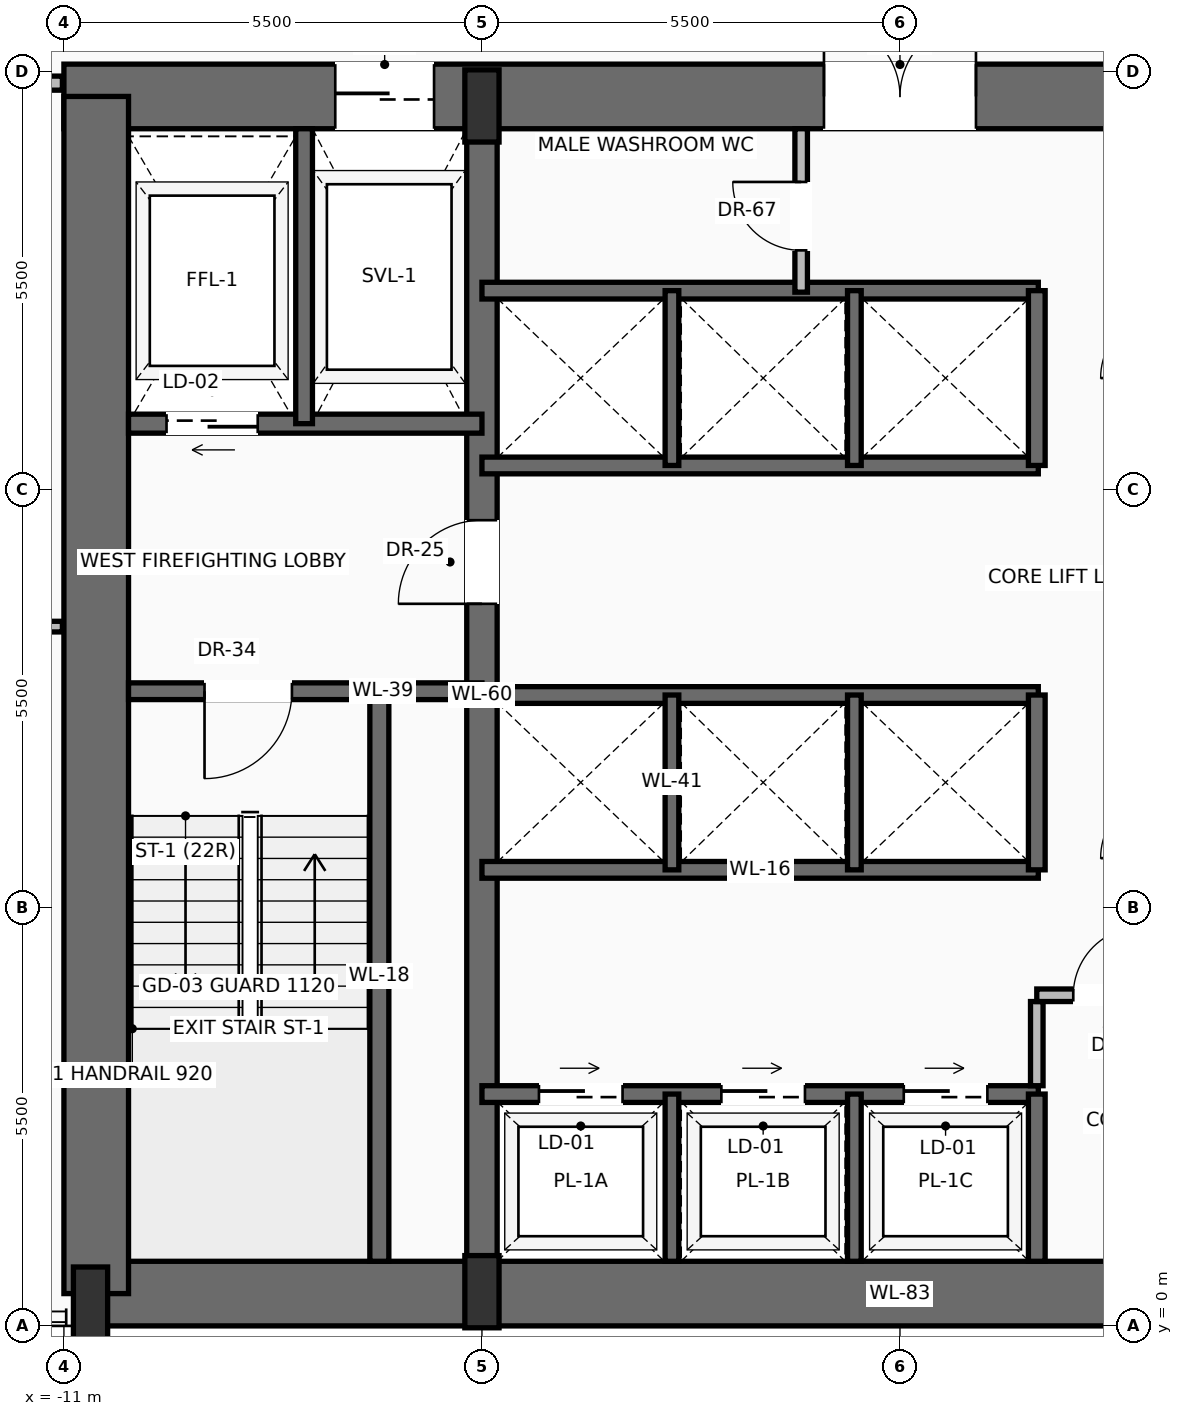
"""IFC4 building model, lengths in metres.
Left out: names, types, materials, properties, quantities, classifications, styles, units other than length and angle.
Written with IfcOpenShell. Run it as: python <this file> out.ifc"""

import sys

from ifc_helpers import new_model, si_unit, direction, frame, frame_2d, origin, origin_2d, place, context, subcontext, project, spatial, rectangle, extrude, source, transform, mapped, element, fill, save


model = new_model("IFC4")
c1 = context("Model", 3, precision=1e-05, world=origin(), true_north=direction((0.0, 1.0)))
c2 = subcontext(c1, "Body", "Model", "MODEL_VIEW")
j1 = project(units=[si_unit("LENGTHUNIT", "METRE"), si_unit("PLANEANGLEUNIT", "RADIAN")], contexts=[c1])
p1 = place(None, origin())
s1 = spatial("IfcSite", under=j1, at=p1, CompositionType="ELEMENT")
p2 = place(p1, origin())
s2 = spatial("IfcBuilding", under=s1, at=p2, CompositionType="ELEMENT")
p3 = place(p2, frame((0.0, 0.0, 64.5)))
s3 = spatial("IfcBuildingStorey", under=s2, at=p3, CompositionType="ELEMENT", Elevation=64.5)
p4 = place(p3, frame((-10.65, 0.425, 0.0), z_axis=(0.0, 0.0, 1.0), x_axis=(1.0, 0.0, 0.0)))
e1 = element("IfcWall", 1, at=p4, inside=s3, PredefinedType="SHEAR", context=c2, shape_type="SweptSolid", body=[
    extrude(rectangle(XDim=21.3, YDim=0.85, at=frame_2d((10.65, 0.0))), origin(), (0.0, 0.0, 1.0), 3.45),
])
p5 = place(p3, frame((-11.0, 16.175, 0.0), z_axis=(0.0, 0.0, 1.0), x_axis=(1.0, 0.0, 0.0)))
e2 = element("IfcWall", 2, at=p5, inside=s3, PredefinedType="SHEAR", context=c2, shape_type="SweptSolid", body=[
    extrude(rectangle(XDim=22.0, YDim=0.85, at=frame_2d((11.0, 0.0))), origin(), (0.0, 0.0, 1.0), 3.45),
])
p6 = place(p5, frame((3.57, 0.0, 0.0)))
e3 = element("IfcOpeningElement", 3, at=p6, cuts=e2, PredefinedType="OPENING", context=c2, shape_type="SweptSolid", body=[
    extrude(rectangle(XDim=1.3, YDim=2.3, at=frame_2d((0.65, 1.15))), frame((0.0, 0.435, 0.0), z_axis=(0.0, -1.0, 0.0), x_axis=(1.0, 0.0, 0.0)), (0.0, 0.0, 1.0), 0.87),
])
p7 = place(p5, frame((10.0, 0.0, 0.0)))
e4 = element("IfcOpeningElement", 4, at=p7, cuts=e2, PredefinedType="OPENING", context=c2, shape_type="SweptSolid", body=[
    extrude(rectangle(XDim=2.0, YDim=2.4, at=frame_2d((1.0, 1.2))), frame((0.0, 0.435, 0.0), z_axis=(0.0, -1.0, 0.0), x_axis=(1.0, 0.0, 0.0)), (0.0, 0.0, 1.0), 0.87),
])
p8 = place(p3, frame((-10.575, 0.425, 0.0), z_axis=(0.0, 0.0, 1.0), x_axis=(0.0, 1.0, 0.0)))
e5 = element("IfcWall", 5, at=p8, inside=s3, PredefinedType="SHEAR", context=c2, shape_type="SweptSolid", body=[
    extrude(rectangle(XDim=15.75, YDim=0.85, at=frame_2d((7.875, 0.0))), origin(), (0.0, 0.0, 1.0), 3.45),
])
p9 = place(p3, frame((-5.5, 0.425, 0.0), z_axis=(0.0, 0.0, 1.0), x_axis=(0.0, 1.0, 0.0)))
e6 = element("IfcWall", 6, at=p9, inside=s3, PredefinedType="SHEAR", context=c2, shape_type="SweptSolid", body=[
    extrude(rectangle(XDim=15.75, YDim=0.4, at=frame_2d((7.875, 0.0))), origin(), (0.0, 0.0, 1.0), 3.45),
])
p10 = place(p9, frame((9.075, 0.0, 0.0)))
e7 = element("IfcOpeningElement", 7, at=p10, cuts=e6, PredefinedType="OPENING", context=c2, shape_type="SweptSolid", body=[
    extrude(rectangle(XDim=1.1, YDim=2.2, at=frame_2d((0.55, 1.1))), frame((0.0, 0.21, 0.0), z_axis=(0.0, -1.0, 0.0), x_axis=(1.0, 0.0, 0.0)), (0.0, 0.0, 1.0), 0.42),
])
m1 = source(origin(), c2, "Body", "SweptSolid", [
    extrude(rectangle(XDim=0.45, YDim=0.95, at=origin_2d()), origin(), (0.0, 0.0, 1.0), 3.7),
])
for number, where, z_axis, x_axis in (
    (8, (-10.65, 0.3, 0.0), (0.0, 0.0, 1.0), (1.0, 0.0, 0.0)),
    (9, (-5.5, 0.45, 0.0), (0.0, 0.0, 1.0), (1.0, 0.0, 0.0)),
    (10, (-5.5, 16.05, 0.0), (0.0, 0.0, 1.0), (1.0, 0.0, 0.0)),
):
    element("IfcColumn", number, at=place(p3, frame(where, z_axis=z_axis, x_axis=x_axis)), inside=s3, PredefinedType="PILASTER", context=c2, shape_type="MappedRepresentation", body=[
        mapped(m1, transform((0.0, 0.0, 0.0), scale=1.0)),
    ])
p11 = place(p3, frame((-6.85, 0.85, 0.0), z_axis=(0.0, 0.0, 1.0), x_axis=(0.0, 1.0, 0.0)))
e11 = element("IfcWall", 11, at=p11, inside=s3, PredefinedType="SOLIDWALL", context=c2, shape_type="SweptSolid", body=[
    extrude(rectangle(XDim=7.5, YDim=0.25, at=frame_2d((3.75, 0.0))), origin(), (0.0, 0.0, 1.0), 3.45),
])
p12 = place(p3, frame((-5.5, 8.35, 0.0), z_axis=(0.0, 0.0, 1.0), x_axis=(-1.0, 0.0, 0.0)))
e12 = element("IfcWall", 12, at=p12, inside=s3, PredefinedType="SOLIDWALL", context=c2, shape_type="SweptSolid", body=[
    extrude(rectangle(XDim=4.65, YDim=0.22, at=frame_2d((2.325, 0.0))), origin(), (0.0, 0.0, 1.0), 3.45),
])
p13 = place(p12, frame((2.5, 0.0, 0.0)))
e13 = element("IfcOpeningElement", 13, at=p13, cuts=e12, PredefinedType="OPENING", context=c2, shape_type="SweptSolid", body=[
    extrude(rectangle(XDim=1.15, YDim=2.2, at=frame_2d((0.575, 1.1))), frame((0.0, 0.12, 0.0), z_axis=(0.0, -1.0, 0.0), x_axis=(1.0, 0.0, 0.0)), (0.0, 0.0, 1.0), 0.24),
])
p14 = place(p3, frame((-5.5, 11.87, 0.0), z_axis=(0.0, 0.0, 1.0), x_axis=(-1.0, 0.0, 0.0)))
e14 = element("IfcWall", 14, at=p14, inside=s3, PredefinedType="SOLIDWALL", context=c2, shape_type="SweptSolid", body=[
    extrude(rectangle(XDim=4.65, YDim=0.25, at=frame_2d((2.325, 0.0))), origin(), (0.0, 0.0, 1.0), 3.45),
])
p15 = place(p14, frame((2.95, 0.0, 0.0)))
e15 = element("IfcOpeningElement", 15, at=p15, cuts=e14, PredefinedType="OPENING", context=c2, shape_type="SweptSolid", body=[
    extrude(rectangle(XDim=1.2, YDim=2.25, at=frame_2d((0.6, 1.125))), frame((0.0, 0.135, 0.0), z_axis=(0.0, -1.0, 0.0), x_axis=(1.0, 0.0, 0.0)), (0.0, 0.0, 1.0), 0.27),
])
p16 = place(p3, frame((-7.84, 11.87, 0.0), z_axis=(0.0, 0.0, 1.0), x_axis=(0.0, 1.0, 0.0)))
e16 = element("IfcWall", 16, at=p16, inside=s3, PredefinedType="SOLIDWALL", context=c2, shape_type="SweptSolid", body=[
    extrude(rectangle(XDim=3.88, YDim=0.22, at=frame_2d((1.94, 0.0))), origin(), (0.0, 0.0, 1.0), 3.45),
])
p17 = place(p3, frame((-5.5, 3.05, 0.0), z_axis=(0.0, 0.0, 1.0), x_axis=(1.0, 0.0, 0.0)))
e17 = element("IfcWall", 17, at=p17, inside=s3, PredefinedType="SOLIDWALL", context=c2, shape_type="SweptSolid", body=[
    extrude(rectangle(XDim=7.32, YDim=0.22, at=frame_2d((3.66, 0.0))), origin(), (0.0, 0.0, 1.0), 3.45),
])
p18 = place(p17, frame((0.75, 0.0, 0.0)))
e18 = element("IfcOpeningElement", 18, at=p18, cuts=e17, PredefinedType="OPENING", context=c2, shape_type="SweptSolid", body=[
    extrude(rectangle(XDim=1.1, YDim=2.2, at=frame_2d((0.55, 1.1))), frame((0.0, 0.12, 0.0), z_axis=(0.0, -1.0, 0.0), x_axis=(1.0, 0.0, 0.0)), (0.0, 0.0, 1.0), 0.24),
])
p19 = place(p17, frame((3.15, 0.0, 0.0)))
e19 = element("IfcOpeningElement", 19, at=p19, cuts=e17, PredefinedType="OPENING", context=c2, shape_type="SweptSolid", body=[
    extrude(rectangle(XDim=1.1, YDim=2.2, at=frame_2d((0.55, 1.1))), frame((0.0, 0.12, 0.0), z_axis=(0.0, -1.0, 0.0), x_axis=(1.0, 0.0, 0.0)), (0.0, 0.0, 1.0), 0.24),
])
p20 = place(p17, frame((5.55, 0.0, 0.0)))
e20 = element("IfcOpeningElement", 20, at=p20, cuts=e17, PredefinedType="OPENING", context=c2, shape_type="SweptSolid", body=[
    extrude(rectangle(XDim=1.1, YDim=2.2, at=frame_2d((0.55, 1.1))), frame((0.0, 0.12, 0.0), z_axis=(0.0, -1.0, 0.0), x_axis=(1.0, 0.0, 0.0)), (0.0, 0.0, 1.0), 0.24),
])
p21 = place(p3, frame((1.8, 0.85, 0.0), z_axis=(0.0, 0.0, 1.0), x_axis=(0.0, 1.0, 0.0)))
e21 = element("IfcWall", 21, at=p21, inside=s3, PredefinedType="SOLIDWALL", context=c2, shape_type="SweptSolid", body=[
    extrude(rectangle(XDim=2.2, YDim=0.22, at=frame_2d((1.1, 0.0))), origin(), (0.0, 0.0, 1.0), 3.45),
])
for number, where, z_axis, x_axis in (
    (22, (-3.0, 0.85, 0.0), (0.0, 0.0, 1.0), (0.0, 1.0, 0.0)),
    (23, (-0.6, 0.85, 0.0), (0.0, 0.0, 1.0), (0.0, 1.0, 0.0)),
):
    element("IfcWall", number, at=place(p3, frame(where, z_axis=z_axis, x_axis=x_axis)), inside=s3, PredefinedType="SOLIDWALL", context=c2, shape_type="SweptSolid", body=[
        extrude(rectangle(XDim=2.2, YDim=0.18, at=frame_2d((1.1, 0.0))), origin(), (0.0, 0.0, 1.0), 3.45),
    ])
p22 = place(p3, frame((1.8, 3.16, 0.0), z_axis=(0.0, 0.0, 1.0), x_axis=(0.0, 1.0, 0.0)))
e24 = element("IfcWall", 24, at=p22, inside=s3, PredefinedType="PARTITIONING", context=c2, shape_type="SweptSolid", body=[
    extrude(rectangle(XDim=1.108, YDim=0.165, at=frame_2d((0.554, 0.0))), origin(), (0.0, 0.0, 1.0), 3.442),
])
p23 = place(p3, frame((1.8, 4.35, 0.0), z_axis=(0.0, 0.0, 1.0), x_axis=(1.0, 0.0, 0.0)))
e25 = element("IfcWall", 25, at=p23, inside=s3, PredefinedType="PARTITIONING", context=c2, shape_type="SweptSolid", body=[
    extrude(rectangle(XDim=3.62, YDim=0.165, at=frame_2d((1.81, 0.0))), origin(), (0.0, 0.0, 1.0), 3.442),
])
p24 = place(p23, frame((0.48, 0.0, 0.0)))
e26 = element("IfcOpeningElement", 26, at=p24, cuts=e25, PredefinedType="OPENING", context=c2, shape_type="SweptSolid", body=[
    extrude(rectangle(XDim=0.9, YDim=2.1, at=frame_2d((0.45, 1.05))), frame((0.0, 0.093, 0.0), z_axis=(0.0, -1.0, 0.0), x_axis=(1.0, 0.0, 0.0)), (0.0, 0.0, 1.0), 0.185),
])
for number, where, z_axis, x_axis in (
    (27, (-5.5, 6.0, 0.0), (0.0, 0.0, 1.0), (1.0, 0.0, 0.0)),
    (28, (-5.5, 8.3, 0.0), (0.0, 0.0, 1.0), (1.0, 0.0, 0.0)),
):
    element("IfcWall", number, at=place(p3, frame(where, z_axis=z_axis, x_axis=x_axis)), inside=s3, PredefinedType="SOLIDWALL", context=c2, shape_type="SweptSolid", body=[
        extrude(rectangle(XDim=7.32, YDim=0.22, at=frame_2d((3.66, 0.0))), origin(), (0.0, 0.0, 1.0), 3.45),
    ])
p25 = place(p3, frame((1.8, 6.0, 0.0), z_axis=(0.0, 0.0, 1.0), x_axis=(0.0, 1.0, 0.0)))
e29 = element("IfcWall", 29, at=p25, inside=s3, PredefinedType="SOLIDWALL", context=c2, shape_type="SweptSolid", body=[
    extrude(rectangle(XDim=2.3, YDim=0.22, at=frame_2d((1.15, 0.0))), origin(), (0.0, 0.0, 1.0), 3.45),
])
for number, where, z_axis, x_axis in (
    (30, (-3.0, 6.0, 0.0), (0.0, 0.0, 1.0), (0.0, 1.0, 0.0)),
    (31, (-0.6, 6.0, 0.0), (0.0, 0.0, 1.0), (0.0, 1.0, 0.0)),
):
    element("IfcWall", number, at=place(p3, frame(where, z_axis=z_axis, x_axis=x_axis)), inside=s3, PredefinedType="SOLIDWALL", context=c2, shape_type="SweptSolid", body=[
        extrude(rectangle(XDim=2.3, YDim=0.18, at=frame_2d((1.15, 0.0))), origin(), (0.0, 0.0, 1.0), 3.45),
    ])
for number, where, z_axis, x_axis in (
    (32, (-5.5, 11.32, 0.0), (0.0, 0.0, 1.0), (1.0, 0.0, 0.0)),
    (33, (-5.5, 13.62, 0.0), (0.0, 0.0, 1.0), (1.0, 0.0, 0.0)),
):
    element("IfcWall", number, at=place(p3, frame(where, z_axis=z_axis, x_axis=x_axis)), inside=s3, PredefinedType="SOLIDWALL", context=c2, shape_type="SweptSolid", body=[
        extrude(rectangle(XDim=7.32, YDim=0.22, at=frame_2d((3.66, 0.0))), origin(), (0.0, 0.0, 1.0), 3.45),
    ])
p26 = place(p3, frame((1.8, 11.32, 0.0), z_axis=(0.0, 0.0, 1.0), x_axis=(0.0, 1.0, 0.0)))
e34 = element("IfcWall", 34, at=p26, inside=s3, PredefinedType="SOLIDWALL", context=c2, shape_type="SweptSolid", body=[
    extrude(rectangle(XDim=2.3, YDim=0.22, at=frame_2d((1.15, 0.0))), origin(), (0.0, 0.0, 1.0), 3.45),
])
for number, where, z_axis, x_axis in (
    (35, (-3.0, 11.32, 0.0), (0.0, 0.0, 1.0), (0.0, 1.0, 0.0)),
    (36, (-0.6, 11.32, 0.0), (0.0, 0.0, 1.0), (0.0, 1.0, 0.0)),
):
    element("IfcWall", number, at=place(p3, frame(where, z_axis=z_axis, x_axis=x_axis)), inside=s3, PredefinedType="SOLIDWALL", context=c2, shape_type="SweptSolid", body=[
        extrude(rectangle(XDim=2.3, YDim=0.18, at=frame_2d((1.15, 0.0))), origin(), (0.0, 0.0, 1.0), 3.45),
    ])
p27 = place(p3, frame((-1.3, 13.6, 0.0), z_axis=(0.0, 0.0, 1.0), x_axis=(0.0, 1.0, 0.0)))
e37 = element("IfcWall", 37, at=p27, inside=s3, PredefinedType="PARTITIONING", context=c2, shape_type="SweptSolid", body=[
    extrude(rectangle(XDim=2.15, YDim=0.165, at=frame_2d((1.075, 0.0))), origin(), (0.0, 0.0, 1.0), 3.442),
])
p28 = place(p27, frame((0.55, 0.0, 0.0)))
e38 = element("IfcOpeningElement", 38, at=p28, cuts=e37, PredefinedType="OPENING", context=c2, shape_type="SweptSolid", body=[
    extrude(rectangle(XDim=0.9, YDim=2.1, at=frame_2d((0.45, 1.05))), frame((0.0, 0.093, 0.0), z_axis=(0.0, -1.0, 0.0), x_axis=(1.0, 0.0, 0.0)), (0.0, 0.0, 1.0), 0.185),
])
p29 = place(p3, frame((-24.009, 16.35, 0.0), z_axis=(0.0, 0.0, 1.0), x_axis=(1.0, 0.0, 0.0)))
e39 = element("IfcWall", 39, at=p29, inside=s3, PredefinedType="PARTITIONING", context=c2, shape_type="SweptSolid", body=[
    extrude(rectangle(XDim=12.989, YDim=0.185, at=frame_2d((6.495, 0.0))), origin(), (0.0, 0.0, 1.0), 2.747),
])
p30 = place(p29, frame((5.404, 0.0, 0.0)))
e40 = element("IfcOpeningElement", 40, at=p30, cuts=e39, PredefinedType="OPENING", context=c2, shape_type="SweptSolid", body=[
    extrude(rectangle(XDim=0.95, YDim=2.2, at=frame_2d((0.475, 1.1))), frame((0.0, 0.103, 0.0), z_axis=(0.0, -1.0, 0.0), x_axis=(1.0, 0.0, 0.0)), (0.0, 0.0, 1.0), 0.205),
])
p31 = place(p3, frame((-27.831, 9.2, 0.0), z_axis=(0.0, 0.0, 1.0), x_axis=(1.0, 0.0, 0.0)))
e41 = element("IfcWall", 41, at=p31, inside=s3, PredefinedType="PARTITIONING", context=c2, shape_type="SweptSolid", body=[
    extrude(rectangle(XDim=16.811, YDim=0.14, at=frame_2d((8.405, 0.0))), origin(), (0.0, 0.0, 1.0), 3.442),
])
p32 = place(p31, frame((7.941, 0.0, 0.0)))
e42 = element("IfcOpeningElement", 42, at=p32, cuts=e41, PredefinedType="OPENING", context=c2, shape_type="SweptSolid", body=[
    extrude(rectangle(XDim=0.95, YDim=2.2, at=frame_2d((0.475, 1.1))), frame((0.0, 0.08, 0.0), z_axis=(0.0, -1.0, 0.0), x_axis=(1.0, 0.0, 0.0)), (0.0, 0.0, 1.0), 0.16),
])
m2 = source(origin(), c2, "Body", "SweptSolid", [
    extrude(rectangle(XDim=1.15, YDim=2.2, at=frame_2d((0.575, 1.1))), frame((0.0, 0.025, 0.0), z_axis=(0.0, -1.0, 0.0), x_axis=(1.0, 0.0, 0.0)), (0.0, 0.0, 1.0), 0.05),
])
p33 = place(p13, origin())
e43 = element("IfcDoor", 43, at=p33, inside=s3, OperationType="SINGLE_SWING_RIGHT", PredefinedType="DOOR", context=c2, shape_type="MappedRepresentation", body=[
    mapped(m2, transform((0.0, 0.0, 0.0), scale=1.0)),
])
fill(e13, e43)
m3 = source(origin(), c2, "Body", "SweptSolid", [
    extrude(rectangle(XDim=1.1, YDim=2.2, at=frame_2d((0.55, 1.1))), frame((0.0, 0.025, 0.0), z_axis=(0.0, -1.0, 0.0), x_axis=(1.0, 0.0, 0.0)), (0.0, 0.0, 1.0), 0.05),
])
p34 = place(p10, origin())
e44 = element("IfcDoor", 44, at=p34, inside=s3, OperationType="SINGLE_SWING_LEFT", PredefinedType="DOOR", context=c2, shape_type="MappedRepresentation", body=[
    mapped(m3, transform((0.0, 0.0, 0.0), scale=1.0)),
])
fill(e7, e44)
m4 = source(origin(), c2, "Body", "SweptSolid", [
    extrude(rectangle(XDim=1.2, YDim=2.25, at=frame_2d((0.6, 1.125))), frame((0.0, 0.025, 0.0), z_axis=(0.0, -1.0, 0.0), x_axis=(1.0, 0.0, 0.0)), (0.0, 0.0, 1.0), 0.05),
])
p35 = place(p15, origin())
e45 = element("IfcDoor", 45, at=p35, inside=s3, OperationType="SLIDING_TO_LEFT", PredefinedType="DOOR", context=c2, shape_type="MappedRepresentation", body=[
    mapped(m4, transform((0.0, 0.0, 0.0), scale=1.0)),
])
fill(e15, e45)
m5 = source(origin(), c2, "Body", "SweptSolid", [
    extrude(rectangle(XDim=1.3, YDim=2.3, at=frame_2d((0.65, 1.15))), frame((0.0, 0.025, 0.0), z_axis=(0.0, -1.0, 0.0), x_axis=(1.0, 0.0, 0.0)), (0.0, 0.0, 1.0), 0.05),
])
p36 = place(p6, origin())
e46 = element("IfcDoor", 46, at=p36, inside=s3, OperationType="SLIDING_TO_RIGHT", PredefinedType="DOOR", context=c2, shape_type="MappedRepresentation", body=[
    mapped(m5, transform((0.0, 0.0, 0.0), scale=1.0)),
])
fill(e3, e46)
m6 = source(origin(), c2, "Body", "SweptSolid", [
    extrude(rectangle(XDim=2.0, YDim=2.4, at=frame_2d((1.0, 1.2))), frame((0.0, 0.025, 0.0), z_axis=(0.0, -1.0, 0.0), x_axis=(1.0, 0.0, 0.0)), (0.0, 0.0, 1.0), 0.05),
])
p37 = place(p7, origin())
e47 = element("IfcDoor", 47, at=p37, inside=s3, OperationType="DOUBLE_DOOR_SINGLE_SWING", PredefinedType="DOOR", context=c2, shape_type="MappedRepresentation", body=[
    mapped(m6, transform((0.0, 0.0, 0.0), scale=1.0)),
])
fill(e4, e47)
m7 = source(origin(), c2, "Body", "SweptSolid", [
    extrude(rectangle(XDim=1.1, YDim=2.2, at=frame_2d((0.55, 1.1))), frame((0.0, 0.025, 0.0), z_axis=(0.0, -1.0, 0.0), x_axis=(1.0, 0.0, 0.0)), (0.0, 0.0, 1.0), 0.05),
])
p38 = place(p18, origin())
e48 = element("IfcDoor", 48, at=p38, inside=s3, OperationType="SLIDING_TO_RIGHT", PredefinedType="DOOR", context=c2, shape_type="MappedRepresentation", body=[
    mapped(m7, transform((0.0, 0.0, 0.0), scale=1.0)),
])
fill(e18, e48)
p39 = place(p19, origin())
e49 = element("IfcDoor", 49, at=p39, inside=s3, OperationType="SLIDING_TO_RIGHT", PredefinedType="DOOR", context=c2, shape_type="MappedRepresentation", body=[
    mapped(m7, transform((0.0, 0.0, 0.0), scale=1.0)),
])
fill(e19, e49)
p40 = place(p20, origin())
e50 = element("IfcDoor", 50, at=p40, inside=s3, OperationType="SLIDING_TO_RIGHT", PredefinedType="DOOR", context=c2, shape_type="MappedRepresentation", body=[
    mapped(m7, transform((0.0, 0.0, 0.0), scale=1.0)),
])
fill(e20, e50)
m8 = source(origin(), c2, "Body", "SweptSolid", [
    extrude(rectangle(XDim=0.9, YDim=2.1, at=frame_2d((0.45, 1.05))), frame((0.0, 0.025, 0.0), z_axis=(0.0, -1.0, 0.0), x_axis=(1.0, 0.0, 0.0)), (0.0, 0.0, 1.0), 0.05),
])
p41 = place(p24, origin())
e51 = element("IfcDoor", 51, at=p41, inside=s3, OperationType="SINGLE_SWING_RIGHT", PredefinedType="DOOR", context=c2, shape_type="MappedRepresentation", body=[
    mapped(m8, transform((0.0, 0.0, 0.0), scale=1.0)),
])
fill(e26, e51)
p42 = place(p28, origin())
e52 = element("IfcDoor", 52, at=p42, inside=s3, OperationType="SINGLE_SWING_RIGHT", PredefinedType="DOOR", context=c2, shape_type="MappedRepresentation", body=[
    mapped(m8, transform((0.0, 0.0, 0.0), scale=1.0)),
])
fill(e38, e52)
save(model, sys.argv[1])
